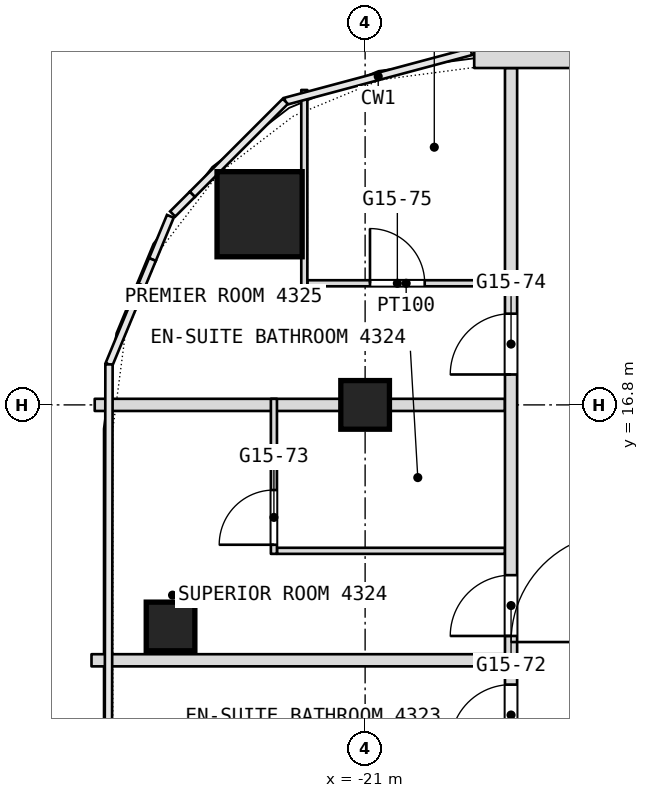
"""IFC4 building model, lengths in metres.
Left out: names, types, materials, properties, quantities, classifications, styles, units other than length and angle.
Written with IfcOpenShell. Run it as: python <this file> out.ifc"""

import sys

from ifc_helpers import new_model, si_unit, direction, frame, frame_2d, origin, origin_2d, place, context, subcontext, project, spatial, rectangle, extrude, element, fill, save


model = new_model("IFC4")
c1 = context("Model", 3, precision=1e-05, world=origin(), true_north=direction((0.0, 1.0)))
c2 = subcontext(c1, "Body", "Model", "MODEL_VIEW")
j1 = project(units=[si_unit("LENGTHUNIT", "METRE"), si_unit("PLANEANGLEUNIT", "RADIAN")], contexts=[c1])
p1 = place(None, origin())
s1 = spatial("IfcSite", under=j1, at=p1, CompositionType="ELEMENT")
p2 = place(p1, origin())
s2 = spatial("IfcBuilding", under=s1, at=p2, CompositionType="ELEMENT")
p3 = place(p2, frame((0.0, 0.0, 191.3)))
s3 = spatial("IfcBuildingStorey", under=s2, at=p3, CompositionType="ELEMENT", Elevation=191.3)
p4 = place(p3, frame((-22.736, 19.936, 0.0), z_axis=(0.0, 0.0, 1.0), x_axis=(1.0, 0.0, 0.0)))
e1 = element("IfcColumn", 1, at=p4, inside=s3, PredefinedType="COLUMN", context=c2, shape_type="SweptSolid", body=[
    extrude(rectangle(XDim=1.4, YDim=1.4, at=origin_2d()), origin(), (0.0, 0.0, 1.0), 3.6),
])
for number, where, z_axis, x_axis in (
    (2, (-21.0, 16.8, 0.0), (0.0, 0.0, 1.0), (1.0, 0.0, 0.0)),
    (3, (-24.2, 13.156, 0.0), (0.0, 0.0, 1.0), (1.0, 0.0, 0.0)),
):
    element("IfcColumn", number, at=place(p3, frame(where, z_axis=z_axis, x_axis=x_axis)), inside=s3, PredefinedType="COLUMN", context=c2, shape_type="SweptSolid", body=[
        extrude(rectangle(XDim=0.8, YDim=0.8, at=origin_2d()), origin(), (0.0, 0.0, 1.0), 3.6),
    ])
p5 = place(p3, frame((-25.5, 12.6, 0.0), z_axis=(0.0, 0.0, 1.0), x_axis=(1.0, 0.0, 0.0)))
e4 = element("IfcWall", 4, at=p5, inside=s3, PredefinedType="PARTITIONING", context=c2, shape_type="SweptSolid", body=[
    extrude(rectangle(XDim=6.8, YDim=0.2, at=frame_2d((3.4, 0.0))), origin(), (0.0, 0.0, 1.0), 3.34),
])
p6 = place(p3, frame((-22.45, 14.4, 0.0), z_axis=(0.0, 0.0, 1.0), x_axis=(1.0, 0.0, 0.0)))
e5 = element("IfcWall", 5, at=p6, inside=s3, PredefinedType="PARTITIONING", context=c2, shape_type="SweptSolid", body=[
    extrude(rectangle(XDim=3.75, YDim=0.1, at=frame_2d((1.875, 0.0))), origin(), (0.0, 0.0, 1.0), 3.34),
])
p7 = place(p3, frame((-25.447, 16.8, 0.0), z_axis=(0.0, 0.0, 1.0), x_axis=(1.0, 0.0, 0.0)))
e6 = element("IfcWall", 6, at=p7, inside=s3, PredefinedType="PARTITIONING", context=c2, shape_type="SweptSolid", body=[
    extrude(rectangle(XDim=6.747, YDim=0.2, at=frame_2d((3.374, 0.0))), origin(), (0.0, 0.0, 1.0), 2.94),
])
p8 = place(p3, frame((-18.6, -26.751, 0.0), z_axis=(0.0, 0.0, 1.0), x_axis=(0.0, 1.0, 0.0)))
e7 = element("IfcWall", 7, at=p8, inside=s3, PredefinedType="PARTITIONING", context=c2, shape_type="SweptSolid", body=[
    extrude(rectangle(XDim=49.091, YDim=0.2, at=frame_2d((24.545, 0.0))), origin(), (0.0, 0.0, 1.0), 3.34),
])
p9 = place(p8, frame((3.413, 0.0, 0.0)))
e8 = element("IfcOpeningElement", 8, at=p9, cuts=e7, PredefinedType="OPENING", context=c2, shape_type="SweptSolid", body=[
    extrude(rectangle(XDim=1.0, YDim=2.1, at=frame_2d((0.5, 1.05))), frame((0.0, 0.1, 0.0), z_axis=(0.0, -1.0, 0.0), x_axis=(1.0, 0.0, 0.0)), (0.0, 0.0, 1.0), 0.2),
])
p10 = place(p8, frame((5.838, 0.0, 0.0)))
e9 = element("IfcOpeningElement", 9, at=p10, cuts=e7, PredefinedType="OPENING", context=c2, shape_type="SweptSolid", body=[
    extrude(rectangle(XDim=1.0, YDim=2.1, at=frame_2d((0.5, 1.05))), frame((0.0, 0.1, 0.0), z_axis=(0.0, -1.0, 0.0), x_axis=(1.0, 0.0, 0.0)), (0.0, 0.0, 1.0), 0.2),
])
p11 = place(p8, frame((10.351, 0.0, 0.0)))
e10 = element("IfcOpeningElement", 10, at=p11, cuts=e7, PredefinedType="OPENING", context=c2, shape_type="SweptSolid", body=[
    extrude(rectangle(XDim=1.0, YDim=2.1, at=frame_2d((0.5, 1.05))), frame((0.0, 0.1, 0.0), z_axis=(0.0, -1.0, 0.0), x_axis=(1.0, 0.0, 0.0)), (0.0, 0.0, 1.0), 0.2),
])
p12 = place(p8, frame((16.951, 0.0, 0.0)))
e11 = element("IfcOpeningElement", 11, at=p12, cuts=e7, PredefinedType="OPENING", context=c2, shape_type="SweptSolid", body=[
    extrude(rectangle(XDim=1.0, YDim=2.1, at=frame_2d((0.5, 1.05))), frame((0.0, 0.1, 0.0), z_axis=(0.0, -1.0, 0.0), x_axis=(1.0, 0.0, 0.0)), (0.0, 0.0, 1.0), 0.2),
])
p13 = place(p8, frame((21.151, 0.0, 0.0)))
e12 = element("IfcOpeningElement", 12, at=p13, cuts=e7, PredefinedType="OPENING", context=c2, shape_type="SweptSolid", body=[
    extrude(rectangle(XDim=1.0, YDim=2.1, at=frame_2d((0.5, 1.05))), frame((0.0, 0.1, 0.0), z_axis=(0.0, -1.0, 0.0), x_axis=(1.0, 0.0, 0.0)), (0.0, 0.0, 1.0), 0.2),
])
p14 = place(p8, frame((22.951, 0.0, 0.0)))
e13 = element("IfcOpeningElement", 13, at=p14, cuts=e7, PredefinedType="OPENING", context=c2, shape_type="SweptSolid", body=[
    extrude(rectangle(XDim=1.0, YDim=2.1, at=frame_2d((0.5, 1.05))), frame((0.0, 0.1, 0.0), z_axis=(0.0, -1.0, 0.0), x_axis=(1.0, 0.0, 0.0)), (0.0, 0.0, 1.0), 0.2),
])
p15 = place(p8, frame((27.151, 0.0, 0.0)))
e14 = element("IfcOpeningElement", 14, at=p15, cuts=e7, PredefinedType="OPENING", context=c2, shape_type="SweptSolid", body=[
    extrude(rectangle(XDim=1.0, YDim=2.1, at=frame_2d((0.5, 1.05))), frame((0.0, 0.1, 0.0), z_axis=(0.0, -1.0, 0.0), x_axis=(1.0, 0.0, 0.0)), (0.0, 0.0, 1.0), 0.2),
])
p16 = place(p8, frame((33.751, 0.0, 0.0)))
e15 = element("IfcOpeningElement", 15, at=p16, cuts=e7, PredefinedType="OPENING", context=c2, shape_type="SweptSolid", body=[
    extrude(rectangle(XDim=1.0, YDim=2.1, at=frame_2d((0.5, 1.05))), frame((0.0, 0.1, 0.0), z_axis=(0.0, -1.0, 0.0), x_axis=(1.0, 0.0, 0.0)), (0.0, 0.0, 1.0), 0.2),
])
p17 = place(p8, frame((37.951, 0.0, 0.0)))
e16 = element("IfcOpeningElement", 16, at=p17, cuts=e7, PredefinedType="OPENING", context=c2, shape_type="SweptSolid", body=[
    extrude(rectangle(XDim=1.0, YDim=2.1, at=frame_2d((0.5, 1.05))), frame((0.0, 0.1, 0.0), z_axis=(0.0, -1.0, 0.0), x_axis=(1.0, 0.0, 0.0)), (0.0, 0.0, 1.0), 0.2),
])
p18 = place(p8, frame((39.751, 0.0, 0.0)))
e17 = element("IfcOpeningElement", 17, at=p18, cuts=e7, PredefinedType="OPENING", context=c2, shape_type="SweptSolid", body=[
    extrude(rectangle(XDim=1.0, YDim=2.1, at=frame_2d((0.5, 1.05))), frame((0.0, 0.1, 0.0), z_axis=(0.0, -1.0, 0.0), x_axis=(1.0, 0.0, 0.0)), (0.0, 0.0, 1.0), 0.2),
])
p19 = place(p8, frame((44.051, 0.0, 0.0)))
e18 = element("IfcOpeningElement", 18, at=p19, cuts=e7, PredefinedType="OPENING", context=c2, shape_type="SweptSolid", body=[
    extrude(rectangle(XDim=1.0, YDim=2.1, at=frame_2d((0.5, 1.05))), frame((0.0, 0.1, 0.0), z_axis=(0.0, -1.0, 0.0), x_axis=(1.0, 0.0, 0.0)), (0.0, 0.0, 1.0), 0.2),
])
p20 = place(p3, frame((-21.95, 18.8, 0.0), z_axis=(0.0, 0.0, 1.0), x_axis=(1.0, 0.0, 0.0)))
e19 = element("IfcWall", 19, at=p20, inside=s3, PredefinedType="PARTITIONING", context=c2, shape_type="SweptSolid", body=[
    extrude(rectangle(XDim=3.25, YDim=0.1, at=frame_2d((1.625, 0.0))), origin(), (0.0, 0.0, 1.0), 3.34),
])
p21 = place(p20, frame((1.03, 0.0, 0.0)))
e20 = element("IfcOpeningElement", 20, at=p21, cuts=e19, PredefinedType="OPENING", context=c2, shape_type="SweptSolid", body=[
    extrude(rectangle(XDim=0.9, YDim=2.1, at=frame_2d((0.45, 1.05))), frame((0.0, 0.05, 0.0), z_axis=(0.0, -1.0, 0.0), x_axis=(1.0, 0.0, 0.0)), (0.0, 0.0, 1.0), 0.1),
])
p22 = place(p3, frame((-22.0, 18.75, 0.0), z_axis=(0.0, 0.0, 1.0), x_axis=(0.0, 1.0, 0.0)))
e21 = element("IfcWall", 21, at=p22, inside=s3, PredefinedType="PARTITIONING", context=c2, shape_type="SweptSolid", body=[
    extrude(rectangle(XDim=3.229, YDim=0.1, at=frame_2d((1.615, 0.0))), origin(), (0.0, 0.0, 1.0), 3.34),
])
p23 = place(p3, frame((-22.5, 14.35, 0.0), z_axis=(0.0, 0.0, 1.0), x_axis=(0.0, 1.0, 0.0)))
e22 = element("IfcWall", 22, at=p23, inside=s3, PredefinedType="PARTITIONING", context=c2, shape_type="SweptSolid", body=[
    extrude(rectangle(XDim=2.55, YDim=0.1, at=frame_2d((1.275, 0.0))), origin(), (0.0, 0.0, 1.0), 3.34),
])
p24 = place(p23, frame((0.15, 0.0, 0.0)))
e23 = element("IfcOpeningElement", 23, at=p24, cuts=e22, PredefinedType="OPENING", context=c2, shape_type="SweptSolid", body=[
    extrude(rectangle(XDim=0.9, YDim=2.1, at=frame_2d((0.45, 1.05))), frame((0.0, 0.05, 0.0), z_axis=(0.0, -1.0, 0.0), x_axis=(1.0, 0.0, 0.0)), (0.0, 0.0, 1.0), 0.1),
])
p25 = place(p3, frame((19.206, 22.49, 0.0), z_axis=(0.0, 0.0, 1.0), x_axis=(-1.0, 0.0, 0.0)))
e24 = element("IfcWall", 24, at=p25, inside=s3, PredefinedType="NOTDEFINED", context=c2, shape_type="SweptSolid", body=[
    extrude(rectangle(XDim=38.412, YDim=0.3, at=frame_2d((19.206, 0.0))), origin(), (0.0, 0.0, 1.0), 3.6),
])
p26 = place(p25, frame((3.306, 0.0, 0.9)))
e25 = element("IfcOpeningElement", 25, at=p26, cuts=e24, PredefinedType="OPENING", context=c2, shape_type="SweptSolid", body=[
    extrude(rectangle(XDim=2.4, YDim=2.1, at=frame_2d((1.2, 1.05))), frame((0.0, 0.15, 0.0), z_axis=(0.0, -1.0, 0.0), x_axis=(1.0, 0.0, 0.0)), (0.0, 0.0, 1.0), 0.3),
])
p27 = place(p25, frame((7.506, 0.0, 0.9)))
e26 = element("IfcOpeningElement", 26, at=p27, cuts=e24, PredefinedType="OPENING", context=c2, shape_type="SweptSolid", body=[
    extrude(rectangle(XDim=2.4, YDim=2.1, at=frame_2d((1.2, 1.05))), frame((0.0, 0.15, 0.0), z_axis=(0.0, -1.0, 0.0), x_axis=(1.0, 0.0, 0.0)), (0.0, 0.0, 1.0), 0.3),
])
p28 = place(p25, frame((11.706, 0.0, 0.9)))
e27 = element("IfcOpeningElement", 27, at=p28, cuts=e24, PredefinedType="OPENING", context=c2, shape_type="SweptSolid", body=[
    extrude(rectangle(XDim=2.4, YDim=2.1, at=frame_2d((1.2, 1.05))), frame((0.0, 0.15, 0.0), z_axis=(0.0, -1.0, 0.0), x_axis=(1.0, 0.0, 0.0)), (0.0, 0.0, 1.0), 0.3),
])
p29 = place(p25, frame((15.906, 0.0, 0.9)))
e28 = element("IfcOpeningElement", 28, at=p29, cuts=e24, PredefinedType="OPENING", context=c2, shape_type="SweptSolid", body=[
    extrude(rectangle(XDim=2.4, YDim=2.1, at=frame_2d((1.2, 1.05))), frame((0.0, 0.15, 0.0), z_axis=(0.0, -1.0, 0.0), x_axis=(1.0, 0.0, 0.0)), (0.0, 0.0, 1.0), 0.3),
])
p30 = place(p25, frame((20.106, 0.0, 0.9)))
e29 = element("IfcOpeningElement", 29, at=p30, cuts=e24, PredefinedType="OPENING", context=c2, shape_type="SweptSolid", body=[
    extrude(rectangle(XDim=2.4, YDim=2.1, at=frame_2d((1.2, 1.05))), frame((0.0, 0.15, 0.0), z_axis=(0.0, -1.0, 0.0), x_axis=(1.0, 0.0, 0.0)), (0.0, 0.0, 1.0), 0.3),
])
p31 = place(p25, frame((24.306, 0.0, 0.9)))
e30 = element("IfcOpeningElement", 30, at=p31, cuts=e24, PredefinedType="OPENING", context=c2, shape_type="SweptSolid", body=[
    extrude(rectangle(XDim=2.4, YDim=2.1, at=frame_2d((1.2, 1.05))), frame((0.0, 0.15, 0.0), z_axis=(0.0, -1.0, 0.0), x_axis=(1.0, 0.0, 0.0)), (0.0, 0.0, 1.0), 0.3),
])
p32 = place(p25, frame((28.506, 0.0, 0.9)))
e31 = element("IfcOpeningElement", 31, at=p32, cuts=e24, PredefinedType="OPENING", context=c2, shape_type="SweptSolid", body=[
    extrude(rectangle(XDim=2.4, YDim=2.1, at=frame_2d((1.2, 1.05))), frame((0.0, 0.15, 0.0), z_axis=(0.0, -1.0, 0.0), x_axis=(1.0, 0.0, 0.0)), (0.0, 0.0, 1.0), 0.3),
])
p33 = place(p25, frame((32.706, 0.0, 0.9)))
e32 = element("IfcOpeningElement", 32, at=p33, cuts=e24, PredefinedType="OPENING", context=c2, shape_type="SweptSolid", body=[
    extrude(rectangle(XDim=2.4, YDim=2.1, at=frame_2d((1.2, 1.05))), frame((0.0, 0.15, 0.0), z_axis=(0.0, -1.0, 0.0), x_axis=(1.0, 0.0, 0.0)), (0.0, 0.0, 1.0), 0.3),
])
p34 = place(p17, origin())
e33 = element("IfcDoor", 33, at=p34, inside=s3, OperationType="SINGLE_SWING_LEFT", PredefinedType="DOOR", context=c2, shape_type="SweptSolid", body=[
    extrude(rectangle(XDim=1.0, YDim=2.1, at=frame_2d((0.5, 1.05))), frame((0.0, 0.025, 0.0), z_axis=(0.0, -1.0, 0.0), x_axis=(1.0, 0.0, 0.0)), (0.0, 0.0, 1.0), 0.05),
])
fill(e16, e33)
p35 = place(p18, origin())
e34 = element("IfcDoor", 34, at=p35, inside=s3, OperationType="SINGLE_SWING_LEFT", PredefinedType="DOOR", context=c2, shape_type="SweptSolid", body=[
    extrude(rectangle(XDim=1.0, YDim=2.1, at=frame_2d((0.5, 1.05))), frame((0.0, 0.025, 0.0), z_axis=(0.0, -1.0, 0.0), x_axis=(1.0, 0.0, 0.0)), (0.0, 0.0, 1.0), 0.05),
])
fill(e17, e34)
p36 = place(p19, origin())
e35 = element("IfcDoor", 35, at=p36, inside=s3, OperationType="SINGLE_SWING_LEFT", PredefinedType="DOOR", context=c2, shape_type="SweptSolid", body=[
    extrude(rectangle(XDim=1.0, YDim=2.1, at=frame_2d((0.5, 1.05))), frame((0.0, 0.025, 0.0), z_axis=(0.0, -1.0, 0.0), x_axis=(1.0, 0.0, 0.0)), (0.0, 0.0, 1.0), 0.05),
])
fill(e18, e35)
p37 = place(p21, origin())
e36 = element("IfcDoor", 36, at=p37, inside=s3, OperationType="SINGLE_SWING_LEFT", PredefinedType="DOOR", context=c2, shape_type="SweptSolid", body=[
    extrude(rectangle(XDim=0.9, YDim=2.1, at=frame_2d((0.45, 1.05))), frame((0.0, 0.025, 0.0), z_axis=(0.0, -1.0, 0.0), x_axis=(1.0, 0.0, 0.0)), (0.0, 0.0, 1.0), 0.05),
])
fill(e20, e36)
p38 = place(p24, origin())
e37 = element("IfcDoor", 37, at=p38, inside=s3, OperationType="SINGLE_SWING_RIGHT", PredefinedType="DOOR", context=c2, shape_type="SweptSolid", body=[
    extrude(rectangle(XDim=0.9, YDim=2.1, at=frame_2d((0.45, 1.05))), frame((0.0, 0.025, 0.0), z_axis=(0.0, -1.0, 0.0), x_axis=(1.0, 0.0, 0.0)), (0.0, 0.0, 1.0), 0.05),
])
fill(e23, e37)
save(model, sys.argv[1])
